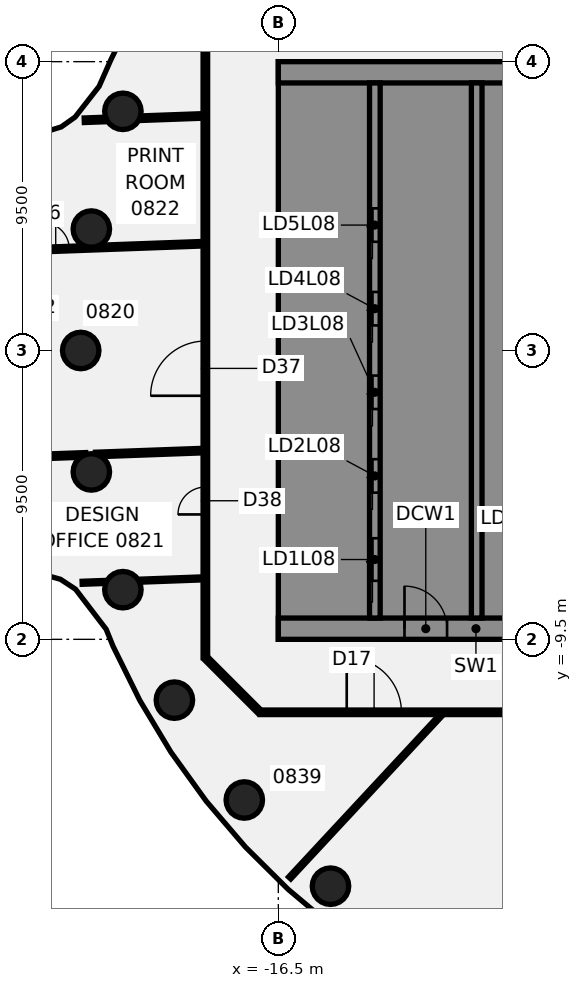
"""IFC4 building model, lengths in metres.
Left out: names, types, materials, properties, quantities, classifications, styles, units other than length and angle.
Written with IfcOpenShell. Run it as: python <this file> out.ifc"""

import sys

from ifc_helpers import new_model, si_unit, direction, frame, frame_2d, origin, origin_2d, place, context, subcontext, project, spatial, polyline, rectangle, circle, outline, extrude, element, fill, save


model = new_model("IFC4")
c1 = context("Model", 3, precision=1e-05, world=origin(), true_north=direction((0.0, 1.0)))
c2 = subcontext(c1, "Body", "Model", "MODEL_VIEW")
j1 = project(units=[si_unit("LENGTHUNIT", "METRE"), si_unit("PLANEANGLEUNIT", "RADIAN")], contexts=[c1])
p1 = place(None, origin())
s1 = spatial("IfcSite", under=j1, at=p1, CompositionType="ELEMENT")
p2 = place(p1, origin())
s2 = spatial("IfcBuilding", under=s1, at=p2, CompositionType="ELEMENT")
p3 = place(p2, frame((0.0, 0.0, 41.5)))
s3 = spatial("IfcBuildingStorey", under=s2, at=p3, CompositionType="ELEMENT", Elevation=41.5)
for number, where, z_axis, x_axis in (
    (1, (-21.613, 7.866, -0.14), (0.0, 0.0, 1.0), (1.0, 0.0, 0.0)),
    (2, (-22.651, 3.994, -0.14), (0.0, 0.0, 1.0), (1.0, 0.0, 0.0)),
    (3, (-23.0, 0.0, -0.14), (0.0, 0.0, 1.0), (1.0, 0.0, 0.0)),
    (4, (-22.651, -3.994, -0.14), (0.0, 0.0, 1.0), (1.0, 0.0, 0.0)),
    (5, (-21.613, -7.866, -0.14), (0.0, 0.0, 1.0), (1.0, 0.0, 0.0)),
    (6, (-19.919, -11.5, -0.14), (0.0, 0.0, 1.0), (1.0, 0.0, 0.0)),
    (7, (-17.619, -14.784, -0.14), (0.0, 0.0, 1.0), (1.0, 0.0, 0.0)),
    (8, (-14.784, -17.619, -0.14), (0.0, 0.0, 1.0), (1.0, 0.0, 0.0)),
):
    element("IfcColumn", number, at=place(p3, frame(where, z_axis=z_axis, x_axis=x_axis)), inside=s3, PredefinedType="COLUMN", context=c2, shape_type="SweptSolid", body=[
        extrude(circle(Radius=0.6, at=origin_2d()), origin(), (0.0, 0.0, 1.0), 3.75),
    ])
p4 = place(p3, frame((-18.872, -10.128, 0.0), z_axis=(0.0, 0.0, 1.0), x_axis=(0.707106781187, -0.707106781187, 0.0)))
e9 = element("IfcWall", 9, at=p4, inside=s3, PredefinedType="PARTITIONING", context=c2, shape_type="SweptSolid", body=[
    extrude(rectangle(XDim=2.465, YDim=0.15, at=frame_2d((1.232, 0.0))), origin(), (0.0, 0.0, 1.0), 3.01),
])
p5 = place(p3, frame((-17.1, -11.9, 0.0), z_axis=(0.0, 0.0, 1.0), x_axis=(1.0, 0.0, 0.0)))
e10 = element("IfcWall", 10, at=p5, inside=s3, PredefinedType="PARTITIONING", context=c2, shape_type="SweptSolid", body=[
    extrude(rectangle(XDim=34.165, YDim=0.15, at=frame_2d((17.083, 0.0))), origin(), (0.0, 0.0, 1.0), 3.01),
])
p6 = place(p5, frame((15.879, 0.0, 0.0)))
e11 = element("IfcOpeningElement", 11, at=p6, cuts=e10, PredefinedType="OPENING", context=c2, shape_type="SweptSolid", body=[
    extrude(rectangle(XDim=1.8, YDim=2.1, at=frame_2d((0.9, 1.05))), frame((0.0, 0.085, 0.0), z_axis=(0.0, -1.0, 0.0), x_axis=(1.0, 0.0, 0.0)), (0.0, 0.0, 1.0), 0.17),
])
p7 = place(p5, frame((2.85, 0.0, 0.0)))
e12 = element("IfcOpeningElement", 12, at=p7, cuts=e10, PredefinedType="OPENING", context=c2, shape_type="SweptSolid", body=[
    extrude(rectangle(XDim=1.8, YDim=2.1, at=frame_2d((0.9, 1.05))), frame((0.0, 0.085, 0.0), z_axis=(0.0, -1.0, 0.0), x_axis=(1.0, 0.0, 0.0)), (0.0, 0.0, 1.0), 0.17),
])
p8 = place(p5, frame((25.687, 0.0, 0.0)))
e13 = element("IfcOpeningElement", 13, at=p8, cuts=e10, PredefinedType="OPENING", context=c2, shape_type="SweptSolid", body=[
    extrude(rectangle(XDim=1.8, YDim=2.1, at=frame_2d((0.9, 1.05))), frame((0.0, 0.085, 0.0), z_axis=(0.0, -1.0, 0.0), x_axis=(1.0, 0.0, 0.0)), (0.0, 0.0, 1.0), 0.17),
])
p9 = place(p3, frame((-25.831, 3.262, 0.0), z_axis=(0.0, 0.0, 1.0), x_axis=(0.999336164515, 0.036431172001, 0.0)))
e14 = element("IfcWall", 14, at=p9, inside=s3, PredefinedType="PARTITIONING", context=c2, shape_type="SweptSolid", body=[
    extrude(rectangle(XDim=6.876, YDim=0.15, at=frame_2d((3.438, 0.0))), origin(), (0.0, 0.0, 1.0), 3.01),
])
p10 = place(p9, frame((1.56, 0.0, 0.0)))
e15 = element("IfcOpeningElement", 15, at=p10, cuts=e14, PredefinedType="OPENING", context=c2, shape_type="SweptSolid", body=[
    extrude(rectangle(XDim=0.9, YDim=2.1, at=frame_2d((0.45, 1.05))), frame((0.0, 0.085, 0.0), z_axis=(0.0, -1.0, 0.0), x_axis=(1.0, 0.0, 0.0)), (0.0, 0.0, 1.0), 0.17),
])
p11 = place(p3, frame((-25.584, -3.533, 0.0), z_axis=(0.0, 0.0, 1.0), x_axis=(0.999336275267, 0.036428133848, 0.0)))
e16 = element("IfcWall", 16, at=p11, inside=s3, PredefinedType="PARTITIONING", context=c2, shape_type="SweptSolid", body=[
    extrude(rectangle(XDim=2.754, YDim=0.15, at=frame_2d((1.377, 0.0))), origin(), (0.0, 0.0, 1.0), 3.01),
])
p12 = place(p3, frame((-22.513, -3.421, 0.0), z_axis=(0.0, 0.0, 1.0), x_axis=(0.999337592386, 0.036391983232, 0.0)))
e17 = element("IfcWall", 17, at=p12, inside=s3, PredefinedType="PARTITIONING", context=c2, shape_type="SweptSolid", body=[
    extrude(rectangle(XDim=3.556, YDim=0.15, at=frame_2d((1.778, 0.0))), origin(), (0.0, 0.0, 1.0), 3.01),
])
p13 = place(p3, frame((-22.953, -7.64, 0.0), z_axis=(0.0, 0.0, 1.0), x_axis=(0.999338892628, 0.036356260539, 0.0)))
e18 = element("IfcWall", 18, at=p13, inside=s3, PredefinedType="PARTITIONING", context=c2, shape_type="SweptSolid", body=[
    extrude(rectangle(XDim=0.799, YDim=0.1, at=frame_2d((0.399, 0.0))), origin(), (0.0, 0.0, 1.0), 3.01),
])
p14 = place(p3, frame((-21.082, -7.572, 0.0), z_axis=(0.0, 0.0, 1.0), x_axis=(0.999331272878, 0.036565106981, 0.0)))
e19 = element("IfcWall", 19, at=p14, inside=s3, PredefinedType="PARTITIONING", context=c2, shape_type="SweptSolid", body=[
    extrude(rectangle(XDim=2.123, YDim=0.1, at=frame_2d((1.062, 0.0))), origin(), (0.0, 0.0, 1.0), 3.01),
])
p15 = place(p3, frame((-22.884, 7.573, 0.0), z_axis=(0.0, 0.0, 1.0), x_axis=(0.999340597236, 0.036309375033, 0.0)))
e20 = element("IfcWall", 20, at=p15, inside=s3, PredefinedType="PARTITIONING", context=c2, shape_type="SweptSolid", body=[
    extrude(rectangle(XDim=0.733, YDim=0.15, at=frame_2d((0.366, 0.0))), origin(), (0.0, 0.0, 1.0), 3.01),
])
p16 = place(p3, frame((-21.064, 7.639, 0.0), z_axis=(0.0, 0.0, 1.0), x_axis=(0.999340952075, 0.03629960752, 0.0)))
e21 = element("IfcWall", 21, at=p16, inside=s3, PredefinedType="PARTITIONING", context=c2, shape_type="SweptSolid", body=[
    extrude(rectangle(XDim=2.105, YDim=0.15, at=frame_2d((1.053, 0.0))), origin(), (0.0, 0.0, 1.0), 3.01),
])
p17 = place(p3, frame((-16.127, -17.348, 0.0), z_axis=(0.0, 0.0, 1.0), x_axis=(0.680886270417, 0.732389163463, 0.0)))
e22 = element("IfcWall", 22, at=p17, inside=s3, PredefinedType="PARTITIONING", context=c2, shape_type="SweptSolid", body=[
    extrude(rectangle(XDim=7.314, YDim=0.1, at=frame_2d((3.657, 0.0))), origin(), (0.0, 0.0, 1.0), 3.01),
])
p18 = place(p3, frame((-18.9, -10.1, 0.0), z_axis=(0.0, 0.0, 1.0), x_axis=(0.0, 1.0, 0.0)))
e23 = element("IfcWall", 23, at=p18, inside=s3, PredefinedType="PARTITIONING", context=c2, shape_type="SweptSolid", body=[
    extrude(rectangle(XDim=20.2, YDim=0.15, at=frame_2d((10.1, 0.0))), origin(), (0.0, 0.0, 1.0), 3.01),
])
p19 = place(p18, frame((8.611, 0.0, 0.0)))
e24 = element("IfcOpeningElement", 24, at=p19, cuts=e23, PredefinedType="OPENING", context=c2, shape_type="SweptSolid", body=[
    extrude(rectangle(XDim=1.8, YDim=2.1, at=frame_2d((0.9, 1.05))), frame((0.0, 0.085, 0.0), z_axis=(0.0, -1.0, 0.0), x_axis=(1.0, 0.0, 0.0)), (0.0, 0.0, 1.0), 0.17),
])
p20 = place(p18, frame((4.708, 0.0, 0.0)))
e25 = element("IfcOpeningElement", 25, at=p20, cuts=e23, PredefinedType="OPENING", context=c2, shape_type="SweptSolid", body=[
    extrude(rectangle(XDim=0.9, YDim=2.1, at=frame_2d((0.45, 1.05))), frame((0.0, 0.085, 0.0), z_axis=(0.0, -1.0, 0.0), x_axis=(1.0, 0.0, 0.0)), (0.0, 0.0, 1.0), 0.17),
])
p21 = place(p3, frame((-16.5, -9.15, 0.0), z_axis=(0.0, 0.0, 1.0), x_axis=(1.0, 0.0, 0.0)))
e26 = element("IfcWall", 26, at=p21, inside=s3, PredefinedType="SHEAR", context=c2, shape_type="SweptSolid", body=[
    extrude(rectangle(XDim=13.0, YDim=0.7, at=frame_2d((6.5, 0.0))), origin(), (0.0, 0.0, 1.0), 3.61),
])
p22 = place(p21, frame((4.15, 0.0, 0.0)))
e27 = element("IfcOpeningElement", 27, at=p22, cuts=e26, PredefinedType="OPENING", context=c2, shape_type="SweptSolid", body=[
    extrude(rectangle(XDim=1.4, YDim=2.1, at=frame_2d((0.7, 1.05))), frame((0.0, 0.36, 0.0), z_axis=(0.0, -1.0, 0.0), x_axis=(1.0, 0.0, 0.0)), (0.0, 0.0, 1.0), 0.72),
])
p23 = place(p21, frame((10.125, 0.0, 0.0)))
e28 = element("IfcOpeningElement", 28, at=p23, cuts=e26, PredefinedType="OPENING", context=c2, shape_type="SweptSolid", body=[
    extrude(rectangle(XDim=1.4, YDim=2.1, at=frame_2d((0.7, 1.05))), frame((0.0, 0.36, 0.0), z_axis=(0.0, -1.0, 0.0), x_axis=(1.0, 0.0, 0.0)), (0.0, 0.0, 1.0), 0.72),
])
p24 = place(p3, origin())
e29 = element("IfcWall", 29, at=p24, inside=s3, PredefinedType="SHEAR", context=c2, shape_type="SweptSolid", body=[
    extrude(outline(polyline([(-13.5, -8.8), (-13.5, -8.125), (-15.8, -8.125), (-15.8, -5.625), (-13.5, -5.625), (-13.5, -5.375), (-15.8, -5.375), (-15.8, -2.875), (-13.5, -2.875), (-13.5, -2.625), (-15.8, -2.625), (-15.8, -0.125), (-13.5, -0.125), (-13.5, 0.125), (-15.8, 0.125), (-15.8, 2.625), (-13.5, 2.625), (-13.5, 2.875), (-15.8, 2.875), (-15.8, 5.375), (-13.5, 5.375), (-13.5, 5.625), (-15.8, 5.625), (-15.8, 8.125), (-13.5, 8.125), (-13.5, 8.8), (-15.8, 8.8), (-16.5, 8.8), (-16.5, -8.8), (-15.8, -8.8), (-13.5, -8.8)])), origin(), (0.0, 0.0, 1.0), 3.61),
])
p25 = place(p3, frame((-16.5, 9.15, 0.0), z_axis=(0.0, 0.0, 1.0), x_axis=(1.0, 0.0, 0.0)))
e30 = element("IfcWall", 30, at=p25, inside=s3, PredefinedType="SHEAR", context=c2, shape_type="SweptSolid", body=[
    extrude(rectangle(XDim=13.0, YDim=0.7, at=frame_2d((6.5, 0.0))), origin(), (0.0, 0.0, 1.0), 3.61),
])
p26 = place(p3, origin())
e31 = element("IfcWall", 31, at=p26, inside=s3, PredefinedType="SHEAR", context=c2, shape_type="SweptSolid", body=[
    extrude(outline(polyline([(-9.8, -5.375), (-9.8, -5.625), (-7.5, -5.625), (-7.15, -5.625), (-7.15, 8.8), (-7.5, 8.8), (-9.8, 8.8), (-9.8, 8.125), (-7.5, 8.125), (-7.5, 5.625), (-9.8, 5.625), (-9.8, 5.375), (-7.5, 5.375), (-7.5, 2.875), (-9.8, 2.875), (-9.8, 2.625), (-7.5, 2.625), (-7.5, 0.125), (-9.8, 0.125), (-9.8, -0.125), (-7.5, -0.125), (-7.5, -2.625), (-9.8, -2.625), (-9.8, -2.875), (-7.5, -2.875), (-7.5, -5.375), (-9.8, -5.375)])), origin(), (0.0, 0.0, 1.0), 3.61),
])
p27 = place(p3, origin())
e32 = element("IfcWall", 32, at=p27, inside=s3, PredefinedType="SHEAR", context=c2, shape_type="SweptSolid", body=[
    extrude(outline(polyline([(-7.5, -8.125), (-9.55, -8.125), (-9.55, -5.625), (-9.8, -5.625), (-9.8, -8.125), (-9.8, -8.8), (-7.5, -8.8), (-7.5, -8.125)])), origin(), (0.0, 0.0, 1.0), 3.61),
])
p28 = place(p3, frame((-13.325, -8.8, 0.0), z_axis=(0.0, 0.0, 1.0), x_axis=(0.0, 1.0, 0.0)))
e33 = element("IfcWall", 33, at=p28, inside=s3, PredefinedType="SHEAR", context=c2, shape_type="SweptSolid", body=[
    extrude(rectangle(XDim=17.6, YDim=0.35, at=frame_2d((8.8, 0.0))), origin(), (0.0, 0.0, 1.0), 3.61),
])
p29 = place(p28, frame((1.225, 0.0, 0.0)))
e34 = element("IfcOpeningElement", 34, at=p29, cuts=e33, PredefinedType="OPENING", context=c2, shape_type="SweptSolid", body=[
    extrude(rectangle(XDim=1.4, YDim=2.1, at=frame_2d((0.7, 1.05))), frame((0.0, 0.185, 0.0), z_axis=(0.0, -1.0, 0.0), x_axis=(1.0, 0.0, 0.0)), (0.0, 0.0, 1.0), 0.37),
])
p30 = place(p28, frame((4.125, 0.0, 0.0)))
e35 = element("IfcOpeningElement", 35, at=p30, cuts=e33, PredefinedType="OPENING", context=c2, shape_type="SweptSolid", body=[
    extrude(rectangle(XDim=1.1, YDim=2.1, at=frame_2d((0.55, 1.05))), frame((0.0, 0.185, 0.0), z_axis=(0.0, -1.0, 0.0), x_axis=(1.0, 0.0, 0.0)), (0.0, 0.0, 1.0), 0.37),
])
p31 = place(p28, frame((6.875, 0.0, 0.0)))
e36 = element("IfcOpeningElement", 36, at=p31, cuts=e33, PredefinedType="OPENING", context=c2, shape_type="SweptSolid", body=[
    extrude(rectangle(XDim=1.1, YDim=2.1, at=frame_2d((0.55, 1.05))), frame((0.0, 0.185, 0.0), z_axis=(0.0, -1.0, 0.0), x_axis=(1.0, 0.0, 0.0)), (0.0, 0.0, 1.0), 0.37),
])
p32 = place(p28, frame((9.625, 0.0, 0.0)))
e37 = element("IfcOpeningElement", 37, at=p32, cuts=e33, PredefinedType="OPENING", context=c2, shape_type="SweptSolid", body=[
    extrude(rectangle(XDim=1.1, YDim=2.1, at=frame_2d((0.55, 1.05))), frame((0.0, 0.185, 0.0), z_axis=(0.0, -1.0, 0.0), x_axis=(1.0, 0.0, 0.0)), (0.0, 0.0, 1.0), 0.37),
])
p33 = place(p28, frame((12.375, 0.0, 0.0)))
e38 = element("IfcOpeningElement", 38, at=p33, cuts=e33, PredefinedType="OPENING", context=c2, shape_type="SweptSolid", body=[
    extrude(rectangle(XDim=1.1, YDim=2.1, at=frame_2d((0.55, 1.05))), frame((0.0, 0.185, 0.0), z_axis=(0.0, -1.0, 0.0), x_axis=(1.0, 0.0, 0.0)), (0.0, 0.0, 1.0), 0.37),
])
p34 = place(p3, frame((-9.975, -8.8, 0.0), z_axis=(0.0, 0.0, 1.0), x_axis=(0.0, 1.0, 0.0)))
e39 = element("IfcWall", 39, at=p34, inside=s3, PredefinedType="SHEAR", context=c2, shape_type="SweptSolid", body=[
    extrude(rectangle(XDim=17.6, YDim=0.35, at=frame_2d((8.8, 0.0))), origin(), (0.0, 0.0, 1.0), 3.61),
])
p35 = place(p7, frame((1.8, 0.0, 0.0), z_axis=(0.0, 0.0, 1.0), x_axis=(-1.0, 0.0, 0.0)))
e40 = element("IfcDoor", 40, at=p35, inside=s3, OperationType="DOUBLE_DOOR_SINGLE_SWING", PredefinedType="DOOR", context=c2, shape_type="SweptSolid", body=[
    extrude(rectangle(XDim=1.8, YDim=2.1, at=frame_2d((0.9, 1.05))), frame((0.0, 0.025, 0.0), z_axis=(0.0, -1.0, 0.0), x_axis=(1.0, 0.0, 0.0)), (0.0, 0.0, 1.0), 0.05),
])
fill(e12, e40)
p36 = place(p10, origin())
e41 = element("IfcDoor", 41, at=p36, inside=s3, OperationType="SINGLE_SWING_RIGHT", PredefinedType="DOOR", context=c2, shape_type="SweptSolid", body=[
    extrude(rectangle(XDim=0.9, YDim=2.1, at=frame_2d((0.45, 1.05))), frame((0.0, 0.025, 0.0), z_axis=(0.0, -1.0, 0.0), x_axis=(1.0, 0.0, 0.0)), (0.0, 0.0, 1.0), 0.05),
])
fill(e15, e41)
p37 = place(p19, frame((1.8, 0.0, 0.0), z_axis=(0.0, 0.0, 1.0), x_axis=(-1.0, 0.0, 0.0)))
e42 = element("IfcDoor", 42, at=p37, inside=s3, OperationType="DOUBLE_DOOR_SINGLE_SWING", PredefinedType="DOOR", context=c2, shape_type="SweptSolid", body=[
    extrude(rectangle(XDim=1.8, YDim=2.1, at=frame_2d((0.9, 1.05))), frame((0.0, 0.025, 0.0), z_axis=(0.0, -1.0, 0.0), x_axis=(1.0, 0.0, 0.0)), (0.0, 0.0, 1.0), 0.05),
])
fill(e24, e42)
p38 = place(p20, origin())
e43 = element("IfcDoor", 43, at=p38, inside=s3, OperationType="SINGLE_SWING_RIGHT", PredefinedType="DOOR", context=c2, shape_type="SweptSolid", body=[
    extrude(rectangle(XDim=0.9, YDim=2.1, at=frame_2d((0.45, 1.05))), frame((0.0, 0.025, 0.0), z_axis=(0.0, -1.0, 0.0), x_axis=(1.0, 0.0, 0.0)), (0.0, 0.0, 1.0), 0.05),
])
fill(e25, e43)
p39 = place(p22, origin())
e44 = element("IfcDoor", 44, at=p39, inside=s3, OperationType="SINGLE_SWING_LEFT", PredefinedType="DOOR", context=c2, shape_type="SweptSolid", body=[
    extrude(rectangle(XDim=1.4, YDim=2.1, at=frame_2d((0.7, 1.05))), frame((0.0, 0.025, 0.0), z_axis=(0.0, -1.0, 0.0), x_axis=(1.0, 0.0, 0.0)), (0.0, 0.0, 1.0), 0.05),
])
fill(e27, e44)
p40 = place(p29, origin())
e45 = element("IfcDoor", 45, at=p40, inside=s3, OperationType="SLIDING_TO_LEFT", PredefinedType="DOOR", context=c2, shape_type="SweptSolid", body=[
    extrude(rectangle(XDim=1.4, YDim=2.1, at=frame_2d((0.7, 1.05))), frame((0.0, 0.025, 0.0), z_axis=(0.0, -1.0, 0.0), x_axis=(1.0, 0.0, 0.0)), (0.0, 0.0, 1.0), 0.05),
])
fill(e34, e45)
p41 = place(p30, origin())
e46 = element("IfcDoor", 46, at=p41, inside=s3, OperationType="SLIDING_TO_LEFT", PredefinedType="DOOR", context=c2, shape_type="SweptSolid", body=[
    extrude(rectangle(XDim=1.1, YDim=2.1, at=frame_2d((0.55, 1.05))), frame((0.0, 0.025, 0.0), z_axis=(0.0, -1.0, 0.0), x_axis=(1.0, 0.0, 0.0)), (0.0, 0.0, 1.0), 0.05),
])
fill(e35, e46)
p42 = place(p31, origin())
e47 = element("IfcDoor", 47, at=p42, inside=s3, OperationType="SLIDING_TO_LEFT", PredefinedType="DOOR", context=c2, shape_type="SweptSolid", body=[
    extrude(rectangle(XDim=1.1, YDim=2.1, at=frame_2d((0.55, 1.05))), frame((0.0, 0.025, 0.0), z_axis=(0.0, -1.0, 0.0), x_axis=(1.0, 0.0, 0.0)), (0.0, 0.0, 1.0), 0.05),
])
fill(e36, e47)
p43 = place(p32, origin())
e48 = element("IfcDoor", 48, at=p43, inside=s3, OperationType="SLIDING_TO_LEFT", PredefinedType="DOOR", context=c2, shape_type="SweptSolid", body=[
    extrude(rectangle(XDim=1.1, YDim=2.1, at=frame_2d((0.55, 1.05))), frame((0.0, 0.025, 0.0), z_axis=(0.0, -1.0, 0.0), x_axis=(1.0, 0.0, 0.0)), (0.0, 0.0, 1.0), 0.05),
])
fill(e37, e48)
p44 = place(p33, origin())
e49 = element("IfcDoor", 49, at=p44, inside=s3, OperationType="SLIDING_TO_LEFT", PredefinedType="DOOR", context=c2, shape_type="SweptSolid", body=[
    extrude(rectangle(XDim=1.1, YDim=2.1, at=frame_2d((0.55, 1.05))), frame((0.0, 0.025, 0.0), z_axis=(0.0, -1.0, 0.0), x_axis=(1.0, 0.0, 0.0)), (0.0, 0.0, 1.0), 0.05),
])
fill(e38, e49)
save(model, sys.argv[1])
